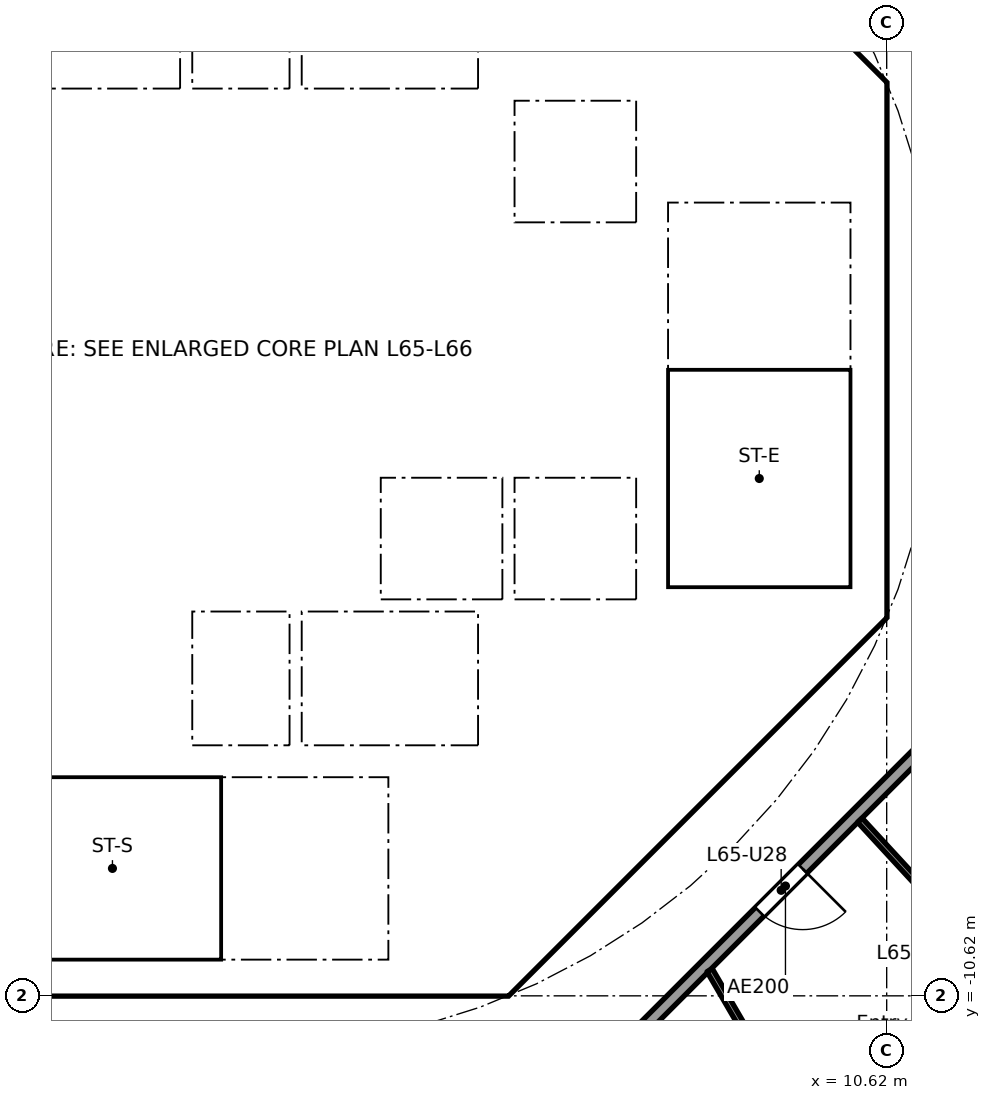
"""IFC4 building model, lengths in metres.
Left out: names, types, materials, properties, quantities, classifications, styles, units other than length and angle.
Written with IfcOpenShell. Run it as: python <this file> out.ifc"""

import sys

from ifc_helpers import new_model, si_unit, direction, frame, frame_2d, origin, place, context, subcontext, project, spatial, polyline, rectangle, outline, extrude, element, fill, save


model = new_model("IFC4")
c1 = context("Model", 3, precision=1e-05, world=origin(), true_north=direction((0.0, 1.0)))
c2 = subcontext(c1, "Body", "Model", "MODEL_VIEW")
j1 = project(units=[si_unit("LENGTHUNIT", "METRE"), si_unit("PLANEANGLEUNIT", "RADIAN")], contexts=[c1])
p1 = place(None, origin())
s1 = spatial("IfcSite", under=j1, at=p1, CompositionType="ELEMENT")
p2 = place(p1, origin())
s2 = spatial("IfcBuilding", under=s1, at=p2, CompositionType="ELEMENT")
p3 = place(p2, frame((0.0, 0.0, 258.5)))
s3 = spatial("IfcBuildingStorey", under=s2, at=p3, CompositionType="ELEMENT", Elevation=258.5)
p4 = place(p3, frame((9.988, 4.613, 0.0), z_axis=(0.0, 0.0, 1.0), x_axis=(-0.707106781187, 0.707106781187, 0.0)))
e1 = element("IfcWall", 1, at=p4, inside=s3, PredefinedType="SHEAR", context=c2, shape_type="SweptSolid", body=[
    extrude(rectangle(XDim=7.602, YDim=0.6, at=frame_2d((3.801, 0.0))), origin(), (0.0, 0.0, 1.0), 3.44),
])
p5 = place(p4, frame((3.201, 0.0, 0.0)))
e2 = element("IfcOpeningElement", 2, at=p5, cuts=e1, PredefinedType="OPENING", context=c2, shape_type="SweptSolid", body=[
    extrude(rectangle(XDim=1.2, YDim=2.1, at=frame_2d((0.6, 1.05))), frame((0.0, 0.31, 0.0), z_axis=(0.0, -1.0, 0.0), x_axis=(1.0, 0.0, 0.0)), (0.0, 0.0, 1.0), 0.62),
])
p6 = place(p3, frame((4.613, -9.988, 0.0), z_axis=(0.0, 0.0, 1.0), x_axis=(0.707106781187, 0.707106781187, 0.0)))
e3 = element("IfcWall", 3, at=p6, inside=s3, PredefinedType="SHEAR", context=c2, shape_type="SweptSolid", body=[
    extrude(rectangle(XDim=7.602, YDim=0.6, at=frame_2d((3.801, 0.0))), origin(), (0.0, 0.0, 1.0), 3.44),
])
p7 = place(p6, frame((3.201, 0.0, 0.0)))
e4 = element("IfcOpeningElement", 4, at=p7, cuts=e3, PredefinedType="OPENING", context=c2, shape_type="SweptSolid", body=[
    extrude(rectangle(XDim=1.2, YDim=2.1, at=frame_2d((0.6, 1.05))), frame((0.0, 0.31, 0.0), z_axis=(0.0, -1.0, 0.0), x_axis=(1.0, 0.0, 0.0)), (0.0, 0.0, 1.0), 0.62),
])
p8 = place(p3, frame((4.0, 4.3, 0.0), z_axis=(0.0, 0.0, 1.0), x_axis=(0.0, 1.0, 0.0)))
e5 = element("IfcWall", 5, at=p8, inside=s3, PredefinedType="SOLIDWALL", context=c2, shape_type="SweptSolid", body=[
    extrude(rectangle(XDim=2.2, YDim=0.2, at=frame_2d((1.1, 0.0))), origin(), (0.0, 0.0, 1.0), 3.44),
])
p9 = place(p8, frame((0.55, 0.0, 0.0)))
e6 = element("IfcOpeningElement", 6, at=p9, cuts=e5, PredefinedType="OPENING", context=c2, shape_type="SweptSolid", body=[
    extrude(rectangle(XDim=1.1, YDim=2.1, at=frame_2d((0.55, 1.05))), frame((0.0, 0.11, 0.0), z_axis=(0.0, -1.0, 0.0), x_axis=(1.0, 0.0, 0.0)), (0.0, 0.0, 1.0), 0.22),
])
p10 = place(p3, frame((-6.7, 2.0, 0.0), z_axis=(0.0, 0.0, 1.0), x_axis=(1.0, 0.0, 0.0)))
e7 = element("IfcWall", 7, at=p10, inside=s3, PredefinedType="SOLIDWALL", context=c2, shape_type="SweptSolid", body=[
    extrude(rectangle(XDim=13.4, YDim=0.2, at=frame_2d((6.7, 0.0))), origin(), (0.0, 0.0, 1.0), 3.44),
])
p11 = place(p10, frame((11.65, 0.0, 0.0)))
e8 = element("IfcOpeningElement", 8, at=p11, cuts=e7, PredefinedType="OPENING", context=c2, shape_type="SweptSolid", body=[
    extrude(rectangle(XDim=1.1, YDim=2.1, at=frame_2d((0.55, 1.05))), frame((0.0, 0.11, 0.0), z_axis=(0.0, -1.0, 0.0), x_axis=(1.0, 0.0, 0.0)), (0.0, 0.0, 1.0), 0.22),
])
p12 = place(p10, frame((2.95, 0.0, 0.0)))
e9 = element("IfcOpeningElement", 9, at=p12, cuts=e7, PredefinedType="OPENING", context=c2, shape_type="SweptSolid", body=[
    extrude(rectangle(XDim=0.9, YDim=2.1, at=frame_2d((0.45, 1.05))), frame((0.0, 0.11, 0.0), z_axis=(0.0, -1.0, 0.0), x_axis=(1.0, 0.0, 0.0)), (0.0, 0.0, 1.0), 0.22),
])
p13 = place(p10, frame((8.45, 0.0, 0.0)))
e10 = element("IfcOpeningElement", 10, at=p13, cuts=e7, PredefinedType="OPENING", context=c2, shape_type="SweptSolid", body=[
    extrude(rectangle(XDim=0.9, YDim=2.1, at=frame_2d((0.45, 1.05))), frame((0.0, 0.11, 0.0), z_axis=(0.0, -1.0, 0.0), x_axis=(1.0, 0.0, 0.0)), (0.0, 0.0, 1.0), 0.22),
])
p14 = place(p3, frame((6.7, 4.0, 0.0), z_axis=(0.0, 0.0, 1.0), x_axis=(1.0, 0.0, 0.0)))
e11 = element("IfcWall", 11, at=p14, inside=s3, PredefinedType="SOLIDWALL", context=c2, shape_type="SweptSolid", body=[
    extrude(rectangle(XDim=3.325, YDim=0.2, at=frame_2d((1.662, 0.0))), origin(), (0.0, 0.0, 1.0), 3.44),
])
p15 = place(p14, frame((1.25, 0.0, 0.0)))
e12 = element("IfcOpeningElement", 12, at=p15, cuts=e11, PredefinedType="OPENING", context=c2, shape_type="SweptSolid", body=[
    extrude(rectangle(XDim=1.1, YDim=2.1, at=frame_2d((0.55, 1.05))), frame((0.0, 0.11, 0.0), z_axis=(0.0, -1.0, 0.0), x_axis=(1.0, 0.0, 0.0)), (0.0, 0.0, 1.0), 0.22),
])
p16 = place(p3, frame((4.0, -10.025, 0.0), z_axis=(0.0, 0.0, 1.0), x_axis=(0.0, 1.0, 0.0)))
e13 = element("IfcWall", 13, at=p16, inside=s3, PredefinedType="SOLIDWALL", context=c2, shape_type="SweptSolid", body=[
    extrude(rectangle(XDim=3.0, YDim=0.2, at=frame_2d((1.5, 0.0))), origin(), (0.0, 0.0, 1.0), 3.44),
])
p17 = place(p16, frame((0.975, 0.0, 0.0)))
e14 = element("IfcOpeningElement", 14, at=p17, cuts=e13, PredefinedType="OPENING", context=c2, shape_type="SweptSolid", body=[
    extrude(rectangle(XDim=1.1, YDim=2.1, at=frame_2d((0.55, 1.05))), frame((0.0, 0.11, 0.0), z_axis=(0.0, -1.0, 0.0), x_axis=(1.0, 0.0, 0.0)), (0.0, 0.0, 1.0), 0.22),
])
p18 = place(p3, frame((4.0, -6.5, 0.0), z_axis=(0.0, 0.0, 1.0), x_axis=(0.0, 1.0, 0.0)))
e15 = element("IfcWall", 15, at=p18, inside=s3, PredefinedType="SOLIDWALL", context=c2, shape_type="SweptSolid", body=[
    extrude(rectangle(XDim=2.2, YDim=0.2, at=frame_2d((1.1, 0.0))), origin(), (0.0, 0.0, 1.0), 3.44),
])
p19 = place(p18, frame((0.55, 0.0, 0.0)))
e16 = element("IfcOpeningElement", 16, at=p19, cuts=e15, PredefinedType="OPENING", context=c2, shape_type="SweptSolid", body=[
    extrude(rectangle(XDim=1.1, YDim=2.1, at=frame_2d((0.55, 1.05))), frame((0.0, 0.11, 0.0), z_axis=(0.0, -1.0, 0.0), x_axis=(1.0, 0.0, 0.0)), (0.0, 0.0, 1.0), 0.22),
])
p20 = place(p3, frame((-6.7, -2.0, 0.0), z_axis=(0.0, 0.0, 1.0), x_axis=(1.0, 0.0, 0.0)))
e17 = element("IfcWall", 17, at=p20, inside=s3, PredefinedType="SOLIDWALL", context=c2, shape_type="SweptSolid", body=[
    extrude(rectangle(XDim=13.4, YDim=0.2, at=frame_2d((6.7, 0.0))), origin(), (0.0, 0.0, 1.0), 3.44),
])
p21 = place(p20, frame((9.45, 0.0, 0.0)))
e18 = element("IfcOpeningElement", 18, at=p21, cuts=e17, PredefinedType="OPENING", context=c2, shape_type="SweptSolid", body=[
    extrude(rectangle(XDim=1.1, YDim=2.1, at=frame_2d((0.55, 1.05))), frame((0.0, 0.11, 0.0), z_axis=(0.0, -1.0, 0.0), x_axis=(1.0, 0.0, 0.0)), (0.0, 0.0, 1.0), 0.22),
])
p22 = place(p20, frame((11.65, 0.0, 0.0)))
e19 = element("IfcOpeningElement", 19, at=p22, cuts=e17, PredefinedType="OPENING", context=c2, shape_type="SweptSolid", body=[
    extrude(rectangle(XDim=1.1, YDim=2.1, at=frame_2d((0.55, 1.05))), frame((0.0, 0.11, 0.0), z_axis=(0.0, -1.0, 0.0), x_axis=(1.0, 0.0, 0.0)), (0.0, 0.0, 1.0), 0.22),
])
p23 = place(p20, frame((1.85, 0.0, 0.0)))
e20 = element("IfcOpeningElement", 20, at=p23, cuts=e17, PredefinedType="OPENING", context=c2, shape_type="SweptSolid", body=[
    extrude(rectangle(XDim=0.9, YDim=2.1, at=frame_2d((0.45, 1.05))), frame((0.0, 0.11, 0.0), z_axis=(0.0, -1.0, 0.0), x_axis=(1.0, 0.0, 0.0)), (0.0, 0.0, 1.0), 0.22),
])
p24 = place(p20, frame((6.25, 0.0, 0.0)))
e21 = element("IfcOpeningElement", 21, at=p24, cuts=e17, PredefinedType="OPENING", context=c2, shape_type="SweptSolid", body=[
    extrude(rectangle(XDim=0.9, YDim=2.1, at=frame_2d((0.45, 1.05))), frame((0.0, 0.11, 0.0), z_axis=(0.0, -1.0, 0.0), x_axis=(1.0, 0.0, 0.0)), (0.0, 0.0, 1.0), 0.22),
])
p25 = place(p3, origin())
e22 = element("IfcWall", 22, at=p25, inside=s3, PredefinedType="SHEAR", context=c2, shape_type="SweptSolid", body=[
    extrude(outline(polyline([(-4.152, -10.025), (4.152, -10.025), (4.401, -9.776), (4.825, -10.2), (4.401, -10.625), (-4.401, -10.625), (-4.825, -10.2), (-4.401, -9.776), (-4.152, -10.025)])), origin(), (0.0, 0.0, 1.0), 3.44),
])
p26 = place(p3, origin())
e23 = element("IfcWall", 23, at=p26, inside=s3, PredefinedType="SHEAR", context=c2, shape_type="SweptSolid", body=[
    extrude(outline(polyline([(9.776, -4.401), (10.025, -4.152), (10.025, -3.801), (10.025, 4.152), (9.776, 4.401), (10.2, 4.825), (10.625, 4.401), (10.625, -4.401), (10.2, -4.825), (9.776, -4.401)])), origin(), (0.0, 0.0, 1.0), 3.44),
])
for number, where, z_axis, x_axis in (
    (24, (-0.9, -6.5, 0.0), (0.0, 0.0, 1.0), (0.0, 1.0, 0.0)),
    (25, (0.9, -6.5, 0.0), (0.0, 0.0, 1.0), (0.0, 1.0, 0.0)),
):
    element("IfcWall", number, at=place(p3, frame(where, z_axis=z_axis, x_axis=x_axis)), inside=s3, PredefinedType="SOLIDWALL", context=c2, shape_type="SweptSolid", body=[
        extrude(rectangle(XDim=2.2, YDim=0.2, at=frame_2d((1.1, 0.0))), origin(), (0.0, 0.0, 1.0), 3.44),
    ])
p27 = place(p3, origin())
e26 = element("IfcWall", 26, at=p27, inside=s3, PredefinedType="SOLIDWALL", context=c2, shape_type="SweptSolid", body=[
    extrude(outline(polyline([(-6.7, -2.1), (-6.5, -2.1), (-6.5, -4.1), (-2.3, -4.1), (-2.3, -2.1), (-2.1, -2.1), (-2.1, -4.1), (2.1, -4.1), (2.1, -2.1), (2.3, -2.1), (2.3, -4.1), (4.3, -4.1), (4.3, -2.1), (4.5, -2.1), (4.5, -4.1), (6.5, -4.1), (6.5, -2.1), (6.7, -2.1), (6.7, -4.3), (-6.7, -4.3), (-6.7, -2.1)])), origin(), (0.0, 0.0, 1.0), 3.44),
])
for number, where, z_axis, x_axis in (
    (27, (-0.9, 4.3, 0.0), (0.0, 0.0, 1.0), (0.0, 1.0, 0.0)),
    (28, (0.9, 4.3, 0.0), (0.0, 0.0, 1.0), (0.0, 1.0, 0.0)),
):
    element("IfcWall", number, at=place(p3, frame(where, z_axis=z_axis, x_axis=x_axis)), inside=s3, PredefinedType="SOLIDWALL", context=c2, shape_type="SweptSolid", body=[
        extrude(rectangle(XDim=2.2, YDim=0.2, at=frame_2d((1.1, 0.0))), origin(), (0.0, 0.0, 1.0), 3.44),
    ])
p28 = place(p3, origin())
e29 = element("IfcWall", 29, at=p28, inside=s3, PredefinedType="SOLIDWALL", context=c2, shape_type="SweptSolid", body=[
    extrude(outline(polyline([(-6.7, 4.3), (6.7, 4.3), (6.7, 2.1), (6.5, 2.1), (6.5, 4.1), (4.5, 4.1), (4.5, 2.1), (4.3, 2.1), (4.3, 4.1), (0.1, 4.1), (0.1, 2.1), (-0.1, 2.1), (-0.1, 4.1), (-6.5, 4.1), (-6.5, 2.1), (-6.7, 2.1), (-6.7, 4.3)])), origin(), (0.0, 0.0, 1.0), 3.44),
])
p29 = place(p3, origin())
e30 = element("IfcWall", 30, at=p29, inside=s3, PredefinedType="SOLIDWALL", context=c2, shape_type="SweptSolid", body=[
    extrude(outline(polyline([(4.1, -7.025), (-4.1, -7.025), (-4.1, -6.5), (4.1, -6.5), (4.1, -7.025)])), origin(), (0.0, 0.0, 1.0), 3.44),
])
p30 = place(p3, origin())
e31 = element("IfcWall", 31, at=p30, inside=s3, PredefinedType="SOLIDWALL", context=c2, shape_type="SweptSolid", body=[
    extrude(outline(polyline([(7.025, -3.9), (6.7, -3.9), (6.7, 3.9), (7.025, 3.9), (7.025, -3.9)])), origin(), (0.0, 0.0, 1.0), 3.44),
])
p31 = place(p3, origin())
e32 = element("IfcWall", 32, at=p31, inside=s3, PredefinedType="SOLIDWALL", context=c2, shape_type="SweptSolid", body=[
    extrude(outline(polyline([(10.025, -4.1), (6.7, -4.1), (6.7, -3.9), (10.025, -3.9), (10.025, -4.1)])), origin(), (0.0, 0.0, 1.0), 3.44),
])
p32 = place(p3, frame((5.275, -12.494, 0.0), z_axis=(0.0, 0.0, 1.0), x_axis=(0.707106781187, 0.707106781187, 0.0)))
e33 = element("IfcWall", 33, at=p32, inside=s3, PredefinedType="PARTITIONING", context=c2, shape_type="SweptSolid", body=[
    extrude(rectangle(XDim=10.409, YDim=0.2, at=frame_2d((5.205, 0.0))), origin(), (0.0, 0.0, 1.0), 3.44),
])
p33 = place(p32, frame((4.604, 0.0, 0.0)))
e34 = element("IfcOpeningElement", 34, at=p33, cuts=e33, PredefinedType="OPENING", context=c2, shape_type="SweptSolid", body=[
    extrude(rectangle(XDim=1.0, YDim=2.1, at=frame_2d((0.5, 1.05))), frame((0.0, 0.11, 0.0), z_axis=(0.0, -1.0, 0.0), x_axis=(1.0, 0.0, 0.0)), (0.0, 0.0, 1.0), 0.22),
])
p34 = place(p3, frame((7.708, -10.198, 0.0), z_axis=(0.0, 0.0, 1.0), x_axis=(0.503838537732, -0.863797851292, 0.0)))
e35 = element("IfcWall", 35, at=p34, inside=s3, PredefinedType="PARTITIONING", context=c2, shape_type="SweptSolid", body=[
    extrude(rectangle(XDim=5.14, YDim=0.1, at=frame_2d((2.57, 0.0))), origin(), (0.0, 0.0, 1.0), 2.762),
])
p35 = place(p34, frame((2.095, 0.0, 0.0)))
e36 = element("IfcOpeningElement", 36, at=p35, cuts=e35, PredefinedType="OPENING", context=c2, shape_type="SweptSolid", body=[
    extrude(rectangle(XDim=0.9, YDim=2.1, at=frame_2d((0.45, 1.05))), frame((0.0, 0.06, 0.0), z_axis=(0.0, -1.0, 0.0), x_axis=(1.0, 0.0, 0.0)), (0.0, 0.0, 1.0), 0.12),
])
p36 = place(p3, frame((10.304, -14.555, 0.0), z_axis=(0.0, 0.0, 1.0), x_axis=(0.628170338674, 0.778075848237, 0.0)))
e37 = element("IfcWall", 37, at=p36, inside=s3, PredefinedType="PARTITIONING", context=c2, shape_type="SweptSolid", body=[
    extrude(rectangle(XDim=4.532, YDim=0.1, at=frame_2d((2.266, 0.0))), origin(), (0.0, 0.0, 1.0), 2.905),
])
p37 = place(p36, frame((1.816, 0.0, 0.0)))
e38 = element("IfcOpeningElement", 38, at=p37, cuts=e37, PredefinedType="OPENING", context=c2, shape_type="SweptSolid", body=[
    extrude(rectangle(XDim=0.9, YDim=2.1, at=frame_2d((0.45, 1.05))), frame((0.0, 0.06, 0.0), z_axis=(0.0, -1.0, 0.0), x_axis=(1.0, 0.0, 0.0)), (0.0, 0.0, 1.0), 0.12),
])
p38 = place(p3, frame((10.179, -7.731, 0.0), z_axis=(0.0, 0.0, 1.0), x_axis=(0.67775318564, -0.73528947997, 0.0)))
e39 = element("IfcWall", 39, at=p38, inside=s3, PredefinedType="PARTITIONING", context=c2, shape_type="SweptSolid", body=[
    extrude(rectangle(XDim=10.222, YDim=0.1, at=frame_2d((5.111, 0.0))), origin(), (0.0, 0.0, 1.0), 2.762),
])
p39 = place(p38, frame((1.766, 0.0, 0.0)))
e40 = element("IfcOpeningElement", 40, at=p39, cuts=e39, PredefinedType="OPENING", context=c2, shape_type="SweptSolid", body=[
    extrude(rectangle(XDim=0.9, YDim=2.1, at=frame_2d((0.45, 1.05))), frame((0.0, 0.06, 0.0), z_axis=(0.0, -1.0, 0.0), x_axis=(1.0, 0.0, 0.0)), (0.0, 0.0, 1.0), 0.12),
])
p40 = place(p11, origin())
e41 = element("IfcDoor", 41, at=p40, inside=s3, OperationType="DOUBLE_DOOR_SLIDING", PredefinedType="DOOR", context=c2, shape_type="SweptSolid", body=[
    extrude(rectangle(XDim=1.1, YDim=2.1, at=frame_2d((0.55, 1.05))), frame((0.0, 0.025, 0.0), z_axis=(0.0, -1.0, 0.0), x_axis=(1.0, 0.0, 0.0)), (0.0, 0.0, 1.0), 0.05),
])
fill(e8, e41)
p41 = place(p21, origin())
e42 = element("IfcDoor", 42, at=p41, inside=s3, OperationType="DOUBLE_DOOR_SLIDING", PredefinedType="DOOR", context=c2, shape_type="SweptSolid", body=[
    extrude(rectangle(XDim=1.1, YDim=2.1, at=frame_2d((0.55, 1.05))), frame((0.0, 0.025, 0.0), z_axis=(0.0, -1.0, 0.0), x_axis=(1.0, 0.0, 0.0)), (0.0, 0.0, 1.0), 0.05),
])
fill(e18, e42)
p42 = place(p22, origin())
e43 = element("IfcDoor", 43, at=p42, inside=s3, OperationType="DOUBLE_DOOR_SLIDING", PredefinedType="DOOR", context=c2, shape_type="SweptSolid", body=[
    extrude(rectangle(XDim=1.1, YDim=2.1, at=frame_2d((0.55, 1.05))), frame((0.0, 0.025, 0.0), z_axis=(0.0, -1.0, 0.0), x_axis=(1.0, 0.0, 0.0)), (0.0, 0.0, 1.0), 0.05),
])
fill(e19, e43)
p43 = place(p9, origin())
e44 = element("IfcDoor", 44, at=p43, inside=s3, OperationType="DOUBLE_DOOR_SLIDING", PredefinedType="DOOR", context=c2, shape_type="SweptSolid", body=[
    extrude(rectangle(XDim=1.1, YDim=2.1, at=frame_2d((0.55, 1.05))), frame((0.0, 0.025, 0.0), z_axis=(0.0, -1.0, 0.0), x_axis=(1.0, 0.0, 0.0)), (0.0, 0.0, 1.0), 0.05),
])
fill(e6, e44)
p44 = place(p19, origin())
e45 = element("IfcDoor", 45, at=p44, inside=s3, OperationType="DOUBLE_DOOR_SLIDING", PredefinedType="DOOR", context=c2, shape_type="SweptSolid", body=[
    extrude(rectangle(XDim=1.1, YDim=2.1, at=frame_2d((0.55, 1.05))), frame((0.0, 0.025, 0.0), z_axis=(0.0, -1.0, 0.0), x_axis=(1.0, 0.0, 0.0)), (0.0, 0.0, 1.0), 0.05),
])
fill(e16, e45)
p45 = place(p15, frame((1.1, 0.0, 0.0), x_axis=(-1.0, 0.0, 0.0)))
e46 = element("IfcDoor", 46, at=p45, inside=s3, OperationType="SINGLE_SWING_LEFT", PredefinedType="DOOR", context=c2, shape_type="SweptSolid", body=[
    extrude(rectangle(XDim=1.1, YDim=2.1, at=frame_2d((0.55, 1.05))), frame((0.0, 0.025, 0.0), z_axis=(0.0, -1.0, 0.0), x_axis=(1.0, 0.0, 0.0)), (0.0, 0.0, 1.0), 0.05),
])
fill(e12, e46)
p46 = place(p17, origin())
e47 = element("IfcDoor", 47, at=p46, inside=s3, OperationType="SINGLE_SWING_LEFT", PredefinedType="DOOR", context=c2, shape_type="SweptSolid", body=[
    extrude(rectangle(XDim=1.1, YDim=2.1, at=frame_2d((0.55, 1.05))), frame((0.0, 0.025, 0.0), z_axis=(0.0, -1.0, 0.0), x_axis=(1.0, 0.0, 0.0)), (0.0, 0.0, 1.0), 0.05),
])
fill(e14, e47)
p47 = place(p12, origin())
e48 = element("IfcDoor", 48, at=p47, inside=s3, OperationType="SINGLE_SWING_RIGHT", PredefinedType="DOOR", context=c2, shape_type="SweptSolid", body=[
    extrude(rectangle(XDim=0.9, YDim=2.1, at=frame_2d((0.45, 1.05))), frame((0.0, 0.025, 0.0), z_axis=(0.0, -1.0, 0.0), x_axis=(1.0, 0.0, 0.0)), (0.0, 0.0, 1.0), 0.05),
])
fill(e9, e48)
p48 = place(p13, origin())
e49 = element("IfcDoor", 49, at=p48, inside=s3, OperationType="SINGLE_SWING_RIGHT", PredefinedType="DOOR", context=c2, shape_type="SweptSolid", body=[
    extrude(rectangle(XDim=0.9, YDim=2.1, at=frame_2d((0.45, 1.05))), frame((0.0, 0.025, 0.0), z_axis=(0.0, -1.0, 0.0), x_axis=(1.0, 0.0, 0.0)), (0.0, 0.0, 1.0), 0.05),
])
fill(e10, e49)
p49 = place(p24, frame((0.9, 0.0, 0.0), x_axis=(-1.0, 0.0, 0.0)))
e50 = element("IfcDoor", 50, at=p49, inside=s3, OperationType="SINGLE_SWING_LEFT", PredefinedType="DOOR", context=c2, shape_type="SweptSolid", body=[
    extrude(rectangle(XDim=0.9, YDim=2.1, at=frame_2d((0.45, 1.05))), frame((0.0, 0.025, 0.0), z_axis=(0.0, -1.0, 0.0), x_axis=(1.0, 0.0, 0.0)), (0.0, 0.0, 1.0), 0.05),
])
fill(e21, e50)
p50 = place(p7, origin())
e51 = element("IfcDoor", 51, at=p50, inside=s3, OperationType="SINGLE_SWING_LEFT", PredefinedType="DOOR", context=c2, shape_type="SweptSolid", body=[
    extrude(rectangle(XDim=1.2, YDim=2.1, at=frame_2d((0.6, 1.05))), frame((0.0, 0.025, 0.0), z_axis=(0.0, -1.0, 0.0), x_axis=(1.0, 0.0, 0.0)), (0.0, 0.0, 1.0), 0.05),
])
fill(e4, e51)
p51 = place(p33, frame((1.0, 0.0, 0.0), x_axis=(-1.0, 0.0, 0.0)))
e52 = element("IfcDoor", 52, at=p51, inside=s3, OperationType="SINGLE_SWING_LEFT", PredefinedType="DOOR", context=c2, shape_type="SweptSolid", body=[
    extrude(rectangle(XDim=1.0, YDim=2.1, at=frame_2d((0.5, 1.05))), frame((0.0, 0.025, 0.0), z_axis=(0.0, -1.0, 0.0), x_axis=(1.0, 0.0, 0.0)), (0.0, 0.0, 1.0), 0.05),
])
fill(e34, e52)
save(model, sys.argv[1])
